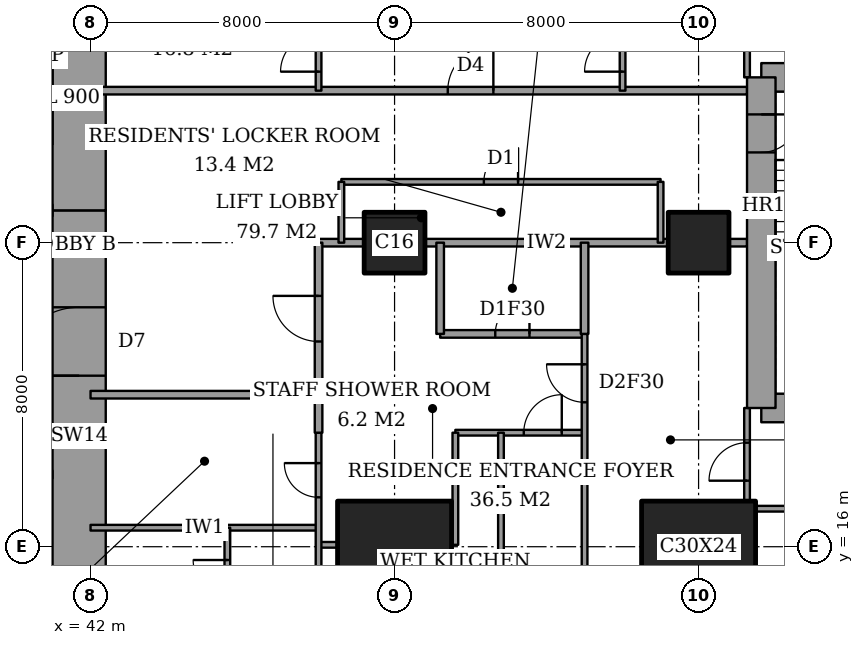
"""IFC4 building model, lengths in metres.
Left out: names, types, materials, properties, quantities, classifications, styles, units other than length and angle.
Written with IfcOpenShell. Run it as: python <this file> out.ifc"""

import sys

from ifc_helpers import new_model, si_unit, direction, frame, frame_2d, origin, origin_2d, place, context, subcontext, project, spatial, rectangle, extrude, element, fill, save


model = new_model("IFC4")
c1 = context("Model", 3, precision=1e-05, world=origin(), true_north=direction((0.0, 1.0)))
c2 = subcontext(c1, "Body", "Model", "MODEL_VIEW")
j1 = project(units=[si_unit("LENGTHUNIT", "METRE"), si_unit("PLANEANGLEUNIT", "RADIAN")], contexts=[c1])
p1 = place(None, origin())
s1 = spatial("IfcSite", under=j1, at=p1, CompositionType="ELEMENT")
p2 = place(p1, origin())
s2 = spatial("IfcBuilding", under=s1, at=p2, CompositionType="ELEMENT")
p3 = place(p2, frame((0.0, 0.0, 241.2)))
s3 = spatial("IfcBuildingStorey", under=s2, at=p3, CompositionType="ELEMENT", Elevation=241.2)
p4 = place(p3, frame((50.0, 16.0, 0.0), z_axis=(0.0, 0.0, 1.0), x_axis=(1.0, 0.0, 0.0)))
e1 = element("IfcColumn", 1, at=p4, inside=s3, PredefinedType="COLUMN", context=c2, shape_type="SweptSolid", body=[
    extrude(rectangle(XDim=3.0, YDim=2.4, at=origin_2d()), origin(), (0.0, 0.0, 1.0), 3.6),
])
p5 = place(p3, frame((50.0, 24.0, 0.0), z_axis=(0.0, 0.0, 1.0), x_axis=(1.0, 0.0, 0.0)))
e2 = element("IfcColumn", 2, at=p5, inside=s3, PredefinedType="COLUMN", context=c2, shape_type="SweptSolid", body=[
    extrude(rectangle(XDim=1.6, YDim=1.6, at=origin_2d()), origin(), (0.0, 0.0, 1.0), 3.6),
])
p6 = place(p3, frame((58.0, 16.0, 0.0), z_axis=(0.0, 0.0, 1.0), x_axis=(1.0, 0.0, 0.0)))
e3 = element("IfcColumn", 3, at=p6, inside=s3, PredefinedType="COLUMN", context=c2, shape_type="SweptSolid", body=[
    extrude(rectangle(XDim=3.0, YDim=2.4, at=origin_2d()), origin(), (0.0, 0.0, 1.0), 3.6),
])
p7 = place(p3, frame((58.0, 24.0, 0.0), z_axis=(0.0, 0.0, 1.0), x_axis=(1.0, 0.0, 0.0)))
e4 = element("IfcColumn", 4, at=p7, inside=s3, PredefinedType="COLUMN", context=c2, shape_type="SweptSolid", body=[
    extrude(rectangle(XDim=1.6, YDim=1.6, at=origin_2d()), origin(), (0.0, 0.0, 1.0), 3.6),
])
p8 = place(p3, frame((41.7, 13.0, 0.0), z_axis=(0.0, 0.0, 1.0), x_axis=(0.0, 1.0, 0.0)))
e5 = element("IfcWall", 5, at=p8, inside=s3, PredefinedType="SHEAR", context=c2, shape_type="SweptSolid", body=[
    extrude(rectangle(XDim=11.85, YDim=1.4, at=frame_2d((5.925, 0.0))), origin(), (0.0, 0.0, 1.0), 3.6),
])
p9 = place(p8, frame((7.5, 0.0, 0.0)))
e6 = element("IfcOpeningElement", 6, at=p9, cuts=e5, PredefinedType="OPENING", context=c2, shape_type="SweptSolid", body=[
    extrude(rectangle(XDim=1.8, YDim=2.4, at=frame_2d((0.9, 1.2))), frame((0.0, 0.71, 0.0), z_axis=(0.0, -1.0, 0.0), x_axis=(1.0, 0.0, 0.0)), (0.0, 0.0, 1.0), 1.42),
])
p10 = place(p3, frame((41.7, 24.85, 0.0), z_axis=(0.0, 0.0, 1.0), x_axis=(0.0, 1.0, 0.0)))
e7 = element("IfcWall", 7, at=p10, inside=s3, PredefinedType="SHEAR", context=c2, shape_type="SweptSolid", body=[
    extrude(rectangle(XDim=10.15, YDim=1.4, at=frame_2d((5.075, 0.0))), origin(), (0.0, 0.0, 1.0), 3.6),
])
for number, where, z_axis, x_axis in (
    (8, (59.65, 19.65, 0.0), (0.0, 0.0, 1.0), (1.0, 0.0, 0.0)),
    (9, (64.1, 28.35, 0.0), (0.0, 0.0, 1.0), (-1.0, 0.0, 0.0)),
):
    element("IfcWall", number, at=place(p3, frame(where, z_axis=z_axis, x_axis=x_axis)), inside=s3, PredefinedType="SHEAR", context=c2, shape_type="SweptSolid", body=[
        extrude(rectangle(XDim=4.45, YDim=0.75, at=frame_2d((2.225, 0.0))), origin(), (0.0, 0.0, 1.0), 3.6),
    ])
p11 = place(p3, frame((59.65, 28.35, 0.0), z_axis=(0.0, 0.0, 1.0), x_axis=(0.0, -1.0, 0.0)))
e10 = element("IfcWall", 10, at=p11, inside=s3, PredefinedType="SHEAR", context=c2, shape_type="SweptSolid", body=[
    extrude(rectangle(XDim=8.7, YDim=0.75, at=frame_2d((4.35, 0.0))), origin(), (0.0, 0.0, 1.0), 3.6),
])
p12 = place(p11, frame((0.975, 0.0, 0.0)))
e11 = element("IfcOpeningElement", 11, at=p12, cuts=e10, PredefinedType="OPENING", context=c2, shape_type="SweptSolid", body=[
    extrude(rectangle(XDim=1.0, YDim=2.1, at=frame_2d((0.5, 1.05))), frame((0.0, 0.385, 0.0), z_axis=(0.0, -1.0, 0.0), x_axis=(1.0, 0.0, 0.0)), (0.0, 0.0, 1.0), 0.77),
])
p13 = place(p3, frame((48.0, 16.05, 0.0), z_axis=(0.0, 0.0, 1.0), x_axis=(1.0, 0.0, 0.0)))
e12 = element("IfcWall", 12, at=p13, inside=s3, PredefinedType="PARTITIONING", context=c2, shape_type="SweptSolid", body=[
    extrude(rectangle(XDim=0.5, YDim=0.15, at=frame_2d((0.25, 0.0))), origin(), (0.0, 0.0, 1.0), 2.634),
])
p14 = place(p3, frame((42.0, 16.5, 0.0), z_axis=(0.0, 0.0, 1.0), x_axis=(1.0, 0.0, 0.0)))
e13 = element("IfcWall", 13, at=p14, inside=s3, PredefinedType="PARTITIONING", context=c2, shape_type="SweptSolid", body=[
    extrude(rectangle(XDim=6.0, YDim=0.15, at=frame_2d((3.0, 0.0))), origin(), (0.0, 0.0, 1.0), 3.35),
])
p15 = place(p3, frame((59.5, 17.0, 0.0), z_axis=(0.0, 0.0, 1.0), x_axis=(1.0, 0.0, 0.0)))
e14 = element("IfcWall", 14, at=p15, inside=s3, PredefinedType="PARTITIONING", context=c2, shape_type="SweptSolid", body=[
    extrude(rectangle(XDim=6.95, YDim=0.15, at=frame_2d((3.475, 0.0))), origin(), (0.0, 0.0, 1.0), 3.35),
])
p16 = place(p3, frame((51.6, 19.0, 0.0), z_axis=(0.0, 0.0, 1.0), x_axis=(1.0, 0.0, 0.0)))
e15 = element("IfcWall", 15, at=p16, inside=s3, PredefinedType="PARTITIONING", context=c2, shape_type="SweptSolid", body=[
    extrude(rectangle(XDim=3.4, YDim=0.15, at=frame_2d((1.7, 0.0))), origin(), (0.0, 0.0, 1.0), 3.35),
])
p17 = place(p16, frame((1.8, 0.0, 0.0)))
e16 = element("IfcOpeningElement", 16, at=p17, cuts=e15, PredefinedType="OPENING", context=c2, shape_type="SweptSolid", body=[
    extrude(rectangle(XDim=1.0, YDim=2.1, at=frame_2d((0.5, 1.05))), frame((0.0, 0.085, 0.0), z_axis=(0.0, -1.0, 0.0), x_axis=(1.0, 0.0, 0.0)), (0.0, 0.0, 1.0), 0.17),
])
p18 = place(p3, frame((42.0, 20.0, 0.0), z_axis=(0.0, 0.0, 1.0), x_axis=(1.0, 0.0, 0.0)))
e17 = element("IfcWall", 17, at=p18, inside=s3, PredefinedType="PARTITIONING", context=c2, shape_type="SweptSolid", body=[
    extrude(rectangle(XDim=6.0, YDim=0.2, at=frame_2d((3.0, 0.0))), origin(), (0.0, 0.0, 1.0), 3.35),
])
p19 = place(p3, frame((51.2, 21.6, 0.0), z_axis=(0.0, 0.0, 1.0), x_axis=(1.0, 0.0, 0.0)))
e18 = element("IfcWall", 18, at=p19, inside=s3, PredefinedType="PARTITIONING", context=c2, shape_type="SweptSolid", body=[
    extrude(rectangle(XDim=3.8, YDim=0.2, at=frame_2d((1.9, 0.0))), origin(), (0.0, 0.0, 1.0), 3.35),
])
p20 = place(p19, frame((1.45, 0.0, 0.0)))
e19 = element("IfcOpeningElement", 19, at=p20, cuts=e18, PredefinedType="OPENING", context=c2, shape_type="SweptSolid", body=[
    extrude(rectangle(XDim=0.9, YDim=2.1, at=frame_2d((0.45, 1.05))), frame((0.0, 0.11, 0.0), z_axis=(0.0, -1.0, 0.0), x_axis=(1.0, 0.0, 0.0)), (0.0, 0.0, 1.0), 0.22),
])
p21 = place(p3, frame((48.0, 24.0, 0.0), z_axis=(0.0, 0.0, 1.0), x_axis=(1.0, 0.0, 0.0)))
e20 = element("IfcWall", 20, at=p21, inside=s3, PredefinedType="PARTITIONING", context=c2, shape_type="SweptSolid", body=[
    extrude(rectangle(XDim=1.2, YDim=0.2, at=frame_2d((0.6, 0.0))), origin(), (0.0, 0.0, 1.0), 3.35),
])
p22 = place(p3, frame((50.8, 24.0, 0.0), z_axis=(0.0, 0.0, 1.0), x_axis=(1.0, 0.0, 0.0)))
e21 = element("IfcWall", 21, at=p22, inside=s3, PredefinedType="PARTITIONING", context=c2, shape_type="SweptSolid", body=[
    extrude(rectangle(XDim=6.4, YDim=0.2, at=frame_2d((3.2, 0.0))), origin(), (0.0, 0.0, 1.0), 3.35),
])
p23 = place(p3, frame((58.8, 24.0, 0.0), z_axis=(0.0, 0.0, 1.0), x_axis=(1.0, 0.0, 0.0)))
e22 = element("IfcWall", 22, at=p23, inside=s3, PredefinedType="PARTITIONING", context=c2, shape_type="SweptSolid", body=[
    extrude(rectangle(XDim=0.475, YDim=0.2, at=frame_2d((0.237, 0.0))), origin(), (0.0, 0.0, 1.0), 3.35),
])
p24 = place(p3, frame((48.6, 25.6, 0.0), z_axis=(0.0, 0.0, 1.0), x_axis=(1.0, 0.0, 0.0)))
e23 = element("IfcWall", 23, at=p24, inside=s3, PredefinedType="PARTITIONING", context=c2, shape_type="SweptSolid", body=[
    extrude(rectangle(XDim=8.4, YDim=0.15, at=frame_2d((4.2, 0.0))), origin(), (0.0, 0.0, 1.0), 3.35),
])
p25 = place(p24, frame((3.75, 0.0, 0.0)))
e24 = element("IfcOpeningElement", 24, at=p25, cuts=e23, PredefinedType="OPENING", context=c2, shape_type="SweptSolid", body=[
    extrude(rectangle(XDim=0.9, YDim=2.1, at=frame_2d((0.45, 1.05))), frame((0.0, 0.085, 0.0), z_axis=(0.0, -1.0, 0.0), x_axis=(1.0, 0.0, 0.0)), (0.0, 0.0, 1.0), 0.17),
])
p26 = place(p3, frame((42.0, 28.0, 0.0), z_axis=(0.0, 0.0, 1.0), x_axis=(1.0, 0.0, 0.0)))
e25 = element("IfcWall", 25, at=p26, inside=s3, PredefinedType="PARTITIONING", context=c2, shape_type="SweptSolid", body=[
    extrude(rectangle(XDim=17.275, YDim=0.2, at=frame_2d((8.637, 0.0))), origin(), (0.0, 0.0, 1.0), 3.35),
])
p27 = place(p26, frame((9.4, 0.0, 0.0)))
e26 = element("IfcOpeningElement", 26, at=p27, cuts=e25, PredefinedType="OPENING", context=c2, shape_type="SweptSolid", body=[
    extrude(rectangle(XDim=1.2, YDim=2.4, at=frame_2d((0.6, 1.2))), frame((0.0, 0.11, 0.0), z_axis=(0.0, -1.0, 0.0), x_axis=(1.0, 0.0, 0.0)), (0.0, 0.0, 1.0), 0.22),
])
p28 = place(p3, frame((45.6, 13.9, 0.0), z_axis=(0.0, 0.0, 1.0), x_axis=(0.0, 1.0, 0.0)))
e27 = element("IfcWall", 27, at=p28, inside=s3, PredefinedType="PARTITIONING", context=c2, shape_type="SweptSolid", body=[
    extrude(rectangle(XDim=2.6, YDim=0.15, at=frame_2d((1.3, 0.0))), origin(), (0.0, 0.0, 1.0), 3.35),
])
p29 = place(p28, frame((0.85, 0.0, 0.0)))
e28 = element("IfcOpeningElement", 28, at=p29, cuts=e27, PredefinedType="OPENING", context=c2, shape_type="SweptSolid", body=[
    extrude(rectangle(XDim=0.9, YDim=2.1, at=frame_2d((0.45, 1.05))), frame((0.0, 0.085, 0.0), z_axis=(0.0, -1.0, 0.0), x_axis=(1.0, 0.0, 0.0)), (0.0, 0.0, 1.0), 0.17),
])
p30 = place(p3, frame((48.0, 19.0, 0.0), z_axis=(0.0, 0.0, 1.0), x_axis=(0.0, 1.0, 0.0)))
e29 = element("IfcWall", 29, at=p30, inside=s3, PredefinedType="PARTITIONING", context=c2, shape_type="SweptSolid", body=[
    extrude(rectangle(XDim=5.0, YDim=0.2, at=frame_2d((2.5, 0.0))), origin(), (0.0, 0.0, 1.0), 3.35),
])
p31 = place(p30, frame((2.4, 0.0, 0.0)))
e30 = element("IfcOpeningElement", 30, at=p31, cuts=e29, PredefinedType="OPENING", context=c2, shape_type="SweptSolid", body=[
    extrude(rectangle(XDim=1.2, YDim=2.4, at=frame_2d((0.6, 1.2))), frame((0.0, 0.11, 0.0), z_axis=(0.0, -1.0, 0.0), x_axis=(1.0, 0.0, 0.0)), (0.0, 0.0, 1.0), 0.22),
])
p32 = place(p3, frame((48.0, 10.6, 0.0), z_axis=(0.0, 0.0, 1.0), x_axis=(0.0, 1.0, 0.0)))
e31 = element("IfcWall", 31, at=p32, inside=s3, PredefinedType="PARTITIONING", context=c2, shape_type="SweptSolid", body=[
    extrude(rectangle(XDim=8.4, YDim=0.15, at=frame_2d((4.2, 0.0))), origin(), (0.0, 0.0, 1.0), 3.35),
])
p33 = place(p32, frame((6.7, 0.0, 0.0)))
e32 = element("IfcOpeningElement", 32, at=p33, cuts=e31, PredefinedType="OPENING", context=c2, shape_type="SweptSolid", body=[
    extrude(rectangle(XDim=0.9, YDim=2.1, at=frame_2d((0.45, 1.05))), frame((0.0, 0.085, 0.0), z_axis=(0.0, -1.0, 0.0), x_axis=(1.0, 0.0, 0.0)), (0.0, 0.0, 1.0), 0.17),
])
p34 = place(p3, frame((48.0, 28.0, 0.0), z_axis=(0.0, 0.0, 1.0), x_axis=(0.0, 1.0, 0.0)))
e33 = element("IfcWall", 33, at=p34, inside=s3, PredefinedType="PARTITIONING", context=c2, shape_type="SweptSolid", body=[
    extrude(rectangle(XDim=9.2, YDim=0.15, at=frame_2d((4.6, 0.0))), origin(), (0.0, 0.0, 1.0), 3.35),
])
p35 = place(p34, frame((0.5, 0.0, 0.0)))
e34 = element("IfcOpeningElement", 34, at=p35, cuts=e33, PredefinedType="OPENING", context=c2, shape_type="SweptSolid", body=[
    extrude(rectangle(XDim=1.0, YDim=2.1, at=frame_2d((0.5, 1.05))), frame((0.0, 0.085, 0.0), z_axis=(0.0, -1.0, 0.0), x_axis=(1.0, 0.0, 0.0)), (0.0, 0.0, 1.0), 0.17),
])
p36 = place(p3, frame((48.6, 24.0, 0.0), z_axis=(0.0, 0.0, 1.0), x_axis=(0.0, 1.0, 0.0)))
e35 = element("IfcWall", 35, at=p36, inside=s3, PredefinedType="PARTITIONING", context=c2, shape_type="SweptSolid", body=[
    extrude(rectangle(XDim=1.6, YDim=0.15, at=frame_2d((0.8, 0.0))), origin(), (0.0, 0.0, 1.0), 3.35),
])
p37 = place(p3, frame((51.2, 21.6, 0.0), z_axis=(0.0, 0.0, 1.0), x_axis=(0.0, 1.0, 0.0)))
e36 = element("IfcWall", 36, at=p37, inside=s3, PredefinedType="PARTITIONING", context=c2, shape_type="SweptSolid", body=[
    extrude(rectangle(XDim=2.4, YDim=0.2, at=frame_2d((1.2, 0.0))), origin(), (0.0, 0.0, 1.0), 3.35),
])
p38 = place(p3, frame((51.6, 16.05, 0.0), z_axis=(0.0, 0.0, 1.0), x_axis=(0.0, 1.0, 0.0)))
e37 = element("IfcWall", 37, at=p38, inside=s3, PredefinedType="PARTITIONING", context=c2, shape_type="SweptSolid", body=[
    extrude(rectangle(XDim=2.95, YDim=0.15, at=frame_2d((1.475, 0.0))), origin(), (0.0, 0.0, 1.0), 3.35),
])
p39 = place(p3, frame((52.8, 10.6, 0.0), z_axis=(0.0, 0.0, 1.0), x_axis=(0.0, 1.0, 0.0)))
e38 = element("IfcWall", 38, at=p39, inside=s3, PredefinedType="PARTITIONING", context=c2, shape_type="SweptSolid", body=[
    extrude(rectangle(XDim=8.4, YDim=0.15, at=frame_2d((4.2, 0.0))), origin(), (0.0, 0.0, 1.0), 3.35),
])
p40 = place(p3, frame((55.0, 21.6, 0.0), z_axis=(0.0, 0.0, 1.0), x_axis=(0.0, 1.0, 0.0)))
e39 = element("IfcWall", 39, at=p40, inside=s3, PredefinedType="PARTITIONING", context=c2, shape_type="SweptSolid", body=[
    extrude(rectangle(XDim=2.4, YDim=0.2, at=frame_2d((1.2, 0.0))), origin(), (0.0, 0.0, 1.0), 3.35),
])
p41 = place(p3, frame((55.0, 10.6, 0.0), z_axis=(0.0, 0.0, 1.0), x_axis=(0.0, 1.0, 0.0)))
e40 = element("IfcWall", 40, at=p41, inside=s3, PredefinedType="PARTITIONING", context=c2, shape_type="SweptSolid", body=[
    extrude(rectangle(XDim=11.0, YDim=0.15, at=frame_2d((5.5, 0.0))), origin(), (0.0, 0.0, 1.0), 3.35),
])
p42 = place(p41, frame((9.2, 0.0, 0.0)))
e41 = element("IfcOpeningElement", 41, at=p42, cuts=e40, PredefinedType="OPENING", context=c2, shape_type="SweptSolid", body=[
    extrude(rectangle(XDim=1.0, YDim=2.1, at=frame_2d((0.5, 1.05))), frame((0.0, 0.085, 0.0), z_axis=(0.0, -1.0, 0.0), x_axis=(1.0, 0.0, 0.0)), (0.0, 0.0, 1.0), 0.17),
])
p43 = place(p3, frame((56.0, 28.0, 0.0), z_axis=(0.0, 0.0, 1.0), x_axis=(0.0, 1.0, 0.0)))
e42 = element("IfcWall", 42, at=p43, inside=s3, PredefinedType="PARTITIONING", context=c2, shape_type="SweptSolid", body=[
    extrude(rectangle(XDim=9.2, YDim=0.15, at=frame_2d((4.6, 0.0))), origin(), (0.0, 0.0, 1.0), 3.35),
])
p44 = place(p43, frame((0.5, 0.0, 0.0)))
e43 = element("IfcOpeningElement", 43, at=p44, cuts=e42, PredefinedType="OPENING", context=c2, shape_type="SweptSolid", body=[
    extrude(rectangle(XDim=1.0, YDim=2.1, at=frame_2d((0.5, 1.05))), frame((0.0, 0.085, 0.0), z_axis=(0.0, -1.0, 0.0), x_axis=(1.0, 0.0, 0.0)), (0.0, 0.0, 1.0), 0.17),
])
p45 = place(p3, frame((57.0, 24.0, 0.0), z_axis=(0.0, 0.0, 1.0), x_axis=(0.0, 1.0, 0.0)))
e44 = element("IfcWall", 44, at=p45, inside=s3, PredefinedType="PARTITIONING", context=c2, shape_type="SweptSolid", body=[
    extrude(rectangle(XDim=1.6, YDim=0.15, at=frame_2d((0.8, 0.0))), origin(), (0.0, 0.0, 1.0), 3.35),
])
p46 = place(p3, frame((59.275, 17.2, 0.0), z_axis=(0.0, 0.0, 1.0), x_axis=(0.0, 1.0, 0.0)))
e45 = element("IfcWall", 45, at=p46, inside=s3, PredefinedType="PARTITIONING", context=c2, shape_type="SweptSolid", body=[
    extrude(rectangle(XDim=2.45, YDim=0.15, at=frame_2d((1.225, 0.0))), origin(), (0.0, 0.0, 1.0), 3.35),
])
p47 = place(p46, frame((0.538, 0.0, 0.0)))
e46 = element("IfcOpeningElement", 46, at=p47, cuts=e45, PredefinedType="OPENING", context=c2, shape_type="SweptSolid", body=[
    extrude(rectangle(XDim=1.0, YDim=2.1, at=frame_2d((0.5, 1.05))), frame((0.0, 0.085, 0.0), z_axis=(0.0, -1.0, 0.0), x_axis=(1.0, 0.0, 0.0)), (0.0, 0.0, 1.0), 0.17),
])
p48 = place(p3, frame((59.275, 28.35, 0.0), z_axis=(0.0, 0.0, 1.0), x_axis=(0.0, 1.0, 0.0)))
e47 = element("IfcWall", 47, at=p48, inside=s3, PredefinedType="PARTITIONING", context=c2, shape_type="SweptSolid", body=[
    extrude(rectangle(XDim=2.45, YDim=0.15, at=frame_2d((1.225, 0.0))), origin(), (0.0, 0.0, 1.0), 3.35),
])
p49 = place(p48, frame((0.913, 0.0, 0.0)))
e48 = element("IfcOpeningElement", 48, at=p49, cuts=e47, PredefinedType="OPENING", context=c2, shape_type="SweptSolid", body=[
    extrude(rectangle(XDim=1.0, YDim=2.1, at=frame_2d((0.5, 1.05))), frame((0.0, 0.085, 0.0), z_axis=(0.0, -1.0, 0.0), x_axis=(1.0, 0.0, 0.0)), (0.0, 0.0, 1.0), 0.17),
])
p50 = place(p3, frame((28.3, 17.9, 0.0), z_axis=(0.0, 0.0, 1.0), x_axis=(1.0, 0.0, 0.0)))
e49 = element("IfcWall", 49, at=p50, inside=s3, PredefinedType="PARTITIONING", context=c2, shape_type="SweptSolid", body=[
    extrude(rectangle(XDim=12.7, YDim=0.2, at=frame_2d((6.35, 0.0))), origin(), (0.0, 0.0, 1.0), 3.6),
])
p51 = place(p50, frame((1.05, 0.0, 0.0)))
e50 = element("IfcOpeningElement", 50, at=p51, cuts=e49, PredefinedType="OPENING", context=c2, shape_type="SweptSolid", body=[
    extrude(rectangle(XDim=0.9, YDim=2.1, at=frame_2d((0.45, 1.05))), frame((0.0, 0.11, 0.0), z_axis=(0.0, -1.0, 0.0), x_axis=(1.0, 0.0, 0.0)), (0.0, 0.0, 1.0), 0.22),
])
p52 = place(p50, frame((7.45, 0.0, 0.0)))
e51 = element("IfcOpeningElement", 51, at=p52, cuts=e49, PredefinedType="OPENING", context=c2, shape_type="SweptSolid", body=[
    extrude(rectangle(XDim=0.9, YDim=2.1, at=frame_2d((0.45, 1.05))), frame((0.0, 0.11, 0.0), z_axis=(0.0, -1.0, 0.0), x_axis=(1.0, 0.0, 0.0)), (0.0, 0.0, 1.0), 0.22),
])
p53 = place(p50, frame((10.6, 0.0, 0.0)))
e52 = element("IfcOpeningElement", 52, at=p53, cuts=e49, PredefinedType="OPENING", context=c2, shape_type="SweptSolid", body=[
    extrude(rectangle(XDim=1.2, YDim=2.1, at=frame_2d((0.6, 1.05))), frame((0.0, 0.11, 0.0), z_axis=(0.0, -1.0, 0.0), x_axis=(1.0, 0.0, 0.0)), (0.0, 0.0, 1.0), 0.22),
])
p54 = place(p47, origin())
e53 = element("IfcDoor", 53, at=p54, inside=s3, OperationType="SINGLE_SWING_RIGHT", PredefinedType="DOOR", context=c2, shape_type="SweptSolid", body=[
    extrude(rectangle(XDim=1.0, YDim=2.1, at=frame_2d((0.5, 1.05))), frame((0.0, 0.025, 0.0), z_axis=(0.0, -1.0, 0.0), x_axis=(1.0, 0.0, 0.0)), (0.0, 0.0, 1.0), 0.05),
])
fill(e46, e53)
p55 = place(p42, origin())
e54 = element("IfcDoor", 54, at=p55, inside=s3, OperationType="SINGLE_SWING_LEFT", PredefinedType="DOOR", context=c2, shape_type="SweptSolid", body=[
    extrude(rectangle(XDim=1.0, YDim=2.1, at=frame_2d((0.5, 1.05))), frame((0.0, 0.025, 0.0), z_axis=(0.0, -1.0, 0.0), x_axis=(1.0, 0.0, 0.0)), (0.0, 0.0, 1.0), 0.05),
])
fill(e41, e54)
p56 = place(p20, origin())
e55 = element("IfcDoor", 55, at=p56, inside=s3, OperationType="SINGLE_SWING_LEFT", PredefinedType="DOOR", context=c2, shape_type="SweptSolid", body=[
    extrude(rectangle(XDim=0.9, YDim=2.1, at=frame_2d((0.45, 1.05))), frame((0.0, 0.025, 0.0), z_axis=(0.0, -1.0, 0.0), x_axis=(1.0, 0.0, 0.0)), (0.0, 0.0, 1.0), 0.05),
])
fill(e19, e55)
p57 = place(p31, origin())
e56 = element("IfcDoor", 56, at=p57, inside=s3, OperationType="SINGLE_SWING_LEFT", PredefinedType="DOOR", context=c2, shape_type="SweptSolid", body=[
    extrude(rectangle(XDim=1.2, YDim=2.4, at=frame_2d((0.6, 1.2))), frame((0.0, 0.025, 0.0), z_axis=(0.0, -1.0, 0.0), x_axis=(1.0, 0.0, 0.0)), (0.0, 0.0, 1.0), 0.05),
])
fill(e30, e56)
p58 = place(p17, origin())
e57 = element("IfcDoor", 57, at=p58, inside=s3, OperationType="SINGLE_SWING_LEFT", PredefinedType="DOOR", context=c2, shape_type="SweptSolid", body=[
    extrude(rectangle(XDim=1.0, YDim=2.1, at=frame_2d((0.5, 1.05))), frame((0.0, 0.025, 0.0), z_axis=(0.0, -1.0, 0.0), x_axis=(1.0, 0.0, 0.0)), (0.0, 0.0, 1.0), 0.05),
])
fill(e16, e57)
p59 = place(p29, origin())
e58 = element("IfcDoor", 58, at=p59, inside=s3, OperationType="SINGLE_SWING_LEFT", PredefinedType="DOOR", context=c2, shape_type="SweptSolid", body=[
    extrude(rectangle(XDim=0.9, YDim=2.1, at=frame_2d((0.45, 1.05))), frame((0.0, 0.025, 0.0), z_axis=(0.0, -1.0, 0.0), x_axis=(1.0, 0.0, 0.0)), (0.0, 0.0, 1.0), 0.05),
])
fill(e28, e58)
p60 = place(p33, origin())
e59 = element("IfcDoor", 59, at=p60, inside=s3, OperationType="SINGLE_SWING_LEFT", PredefinedType="DOOR", context=c2, shape_type="SweptSolid", body=[
    extrude(rectangle(XDim=0.9, YDim=2.1, at=frame_2d((0.45, 1.05))), frame((0.0, 0.025, 0.0), z_axis=(0.0, -1.0, 0.0), x_axis=(1.0, 0.0, 0.0)), (0.0, 0.0, 1.0), 0.05),
])
fill(e32, e59)
p61 = place(p44, origin())
e60 = element("IfcDoor", 60, at=p61, inside=s3, OperationType="SINGLE_SWING_RIGHT", PredefinedType="DOOR", context=c2, shape_type="SweptSolid", body=[
    extrude(rectangle(XDim=1.0, YDim=2.1, at=frame_2d((0.5, 1.05))), frame((0.0, 0.025, 0.0), z_axis=(0.0, -1.0, 0.0), x_axis=(1.0, 0.0, 0.0)), (0.0, 0.0, 1.0), 0.05),
])
fill(e43, e60)
p62 = place(p27, origin())
e61 = element("IfcDoor", 61, at=p62, inside=s3, OperationType="SINGLE_SWING_LEFT", PredefinedType="DOOR", context=c2, shape_type="SweptSolid", body=[
    extrude(rectangle(XDim=1.2, YDim=2.4, at=frame_2d((0.6, 1.2))), frame((0.0, 0.025, 0.0), z_axis=(0.0, -1.0, 0.0), x_axis=(1.0, 0.0, 0.0)), (0.0, 0.0, 1.0), 0.05),
])
fill(e26, e61)
p63 = place(p35, origin())
e62 = element("IfcDoor", 62, at=p63, inside=s3, OperationType="SINGLE_SWING_RIGHT", PredefinedType="DOOR", context=c2, shape_type="SweptSolid", body=[
    extrude(rectangle(XDim=1.0, YDim=2.1, at=frame_2d((0.5, 1.05))), frame((0.0, 0.025, 0.0), z_axis=(0.0, -1.0, 0.0), x_axis=(1.0, 0.0, 0.0)), (0.0, 0.0, 1.0), 0.05),
])
fill(e34, e62)
p64 = place(p25, origin())
e63 = element("IfcDoor", 63, at=p64, inside=s3, OperationType="SINGLE_SWING_LEFT", PredefinedType="DOOR", context=c2, shape_type="SweptSolid", body=[
    extrude(rectangle(XDim=0.9, YDim=2.1, at=frame_2d((0.45, 1.05))), frame((0.0, 0.025, 0.0), z_axis=(0.0, -1.0, 0.0), x_axis=(1.0, 0.0, 0.0)), (0.0, 0.0, 1.0), 0.05),
])
fill(e24, e63)
p65 = place(p9, origin())
e64 = element("IfcDoor", 64, at=p65, inside=s3, OperationType="DOUBLE_DOOR_DOUBLE_SWING", PredefinedType="DOOR", context=c2, shape_type="SweptSolid", body=[
    extrude(rectangle(XDim=1.8, YDim=2.4, at=frame_2d((0.9, 1.2))), frame((0.0, 0.025, 0.0), z_axis=(0.0, -1.0, 0.0), x_axis=(1.0, 0.0, 0.0)), (0.0, 0.0, 1.0), 0.05),
])
fill(e6, e64)
p66 = place(p12, origin())
e65 = element("IfcDoor", 65, at=p66, inside=s3, OperationType="SINGLE_SWING_RIGHT", PredefinedType="DOOR", context=c2, shape_type="SweptSolid", body=[
    extrude(rectangle(XDim=1.0, YDim=2.1, at=frame_2d((0.5, 1.05))), frame((0.0, 0.025, 0.0), z_axis=(0.0, -1.0, 0.0), x_axis=(1.0, 0.0, 0.0)), (0.0, 0.0, 1.0), 0.05),
])
fill(e11, e65)
save(model, sys.argv[1])
